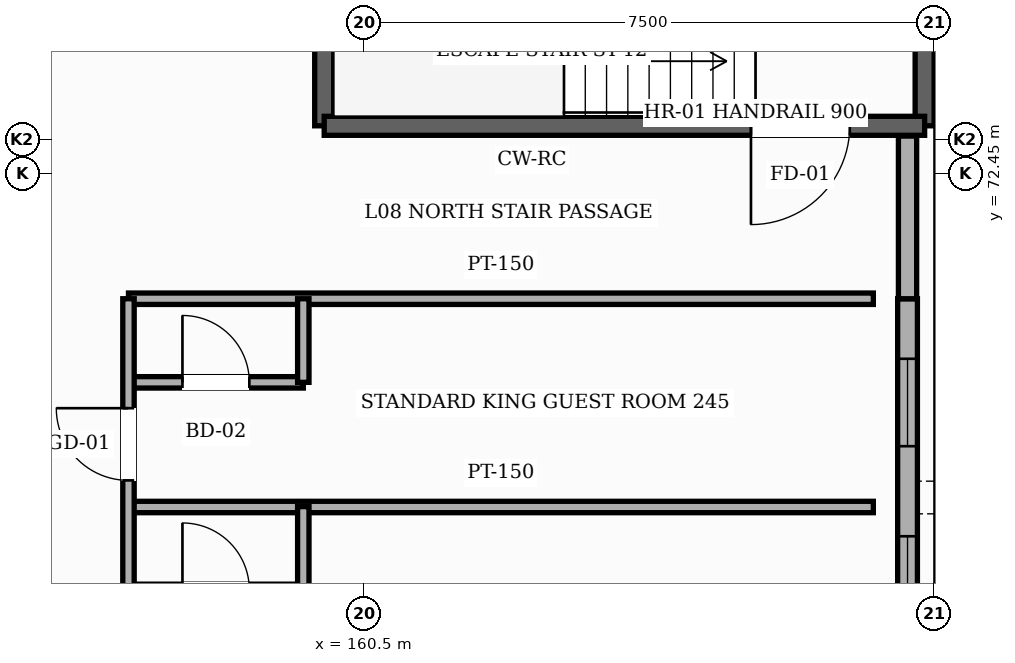
"""IFC4 building model, lengths in metres.
Left out: names, types, materials, properties, quantities, classifications, styles, units other than length and angle.
Written with IfcOpenShell. Run it as: python <this file> out.ifc"""

import sys

from ifc_helpers import new_model, si_unit, direction, frame, frame_2d, origin, place, context, subcontext, project, spatial, rectangle, extrude, element, fill, save


model = new_model("IFC4")
c1 = context("Model", 3, precision=1e-05, world=origin(), true_north=direction((0.0, 1.0)))
c2 = subcontext(c1, "Body", "Model", "MODEL_VIEW")
j1 = project(units=[si_unit("LENGTHUNIT", "METRE"), si_unit("PLANEANGLEUNIT", "RADIAN")], contexts=[c1])
p1 = place(None, origin())
s1 = spatial("IfcSite", under=j1, at=p1, CompositionType="ELEMENT")
p2 = place(p1, origin())
s2 = spatial("IfcBuilding", under=s1, at=p2, CompositionType="ELEMENT")
p3 = place(p2, frame((0.0, 0.0, 35.4)))
s3 = spatial("IfcBuildingStorey", under=s2, at=p3, CompositionType="ELEMENT", Elevation=35.4)
p4 = place(p3, frame((167.65, 70.8, 0.0), z_axis=(0.0, 0.0, 1.0), x_axis=(0.0, -1.0, 0.0)))
e1 = element("IfcWall", 1, at=p4, inside=s3, PredefinedType="SOLIDWALL", context=c2, shape_type="SweptSolid", body=[
    extrude(rectangle(XDim=6.1, YDim=0.26, at=frame_2d((3.05, 0.0))), origin(), (0.0, 0.0, 1.0), 3.365),
])
p5 = place(p4, frame((3.125, 0.0, 0.85)))
e2 = element("IfcOpeningElement", 2, at=p5, cuts=e1, PredefinedType="OPENING", context=c2, shape_type="SweptSolid", body=[
    extrude(rectangle(XDim=1.95, YDim=1.95, at=frame_2d((0.975, 0.975))), frame((0.0, 0.14, 0.0), z_axis=(0.0, -1.0, 0.0), x_axis=(1.0, 0.0, 0.0)), (0.0, 0.0, 1.0), 0.28),
])
p6 = place(p4, frame((0.79, 0.0, 0.85)))
e3 = element("IfcOpeningElement", 3, at=p6, cuts=e1, PredefinedType="OPENING", context=c2, shape_type="SweptSolid", body=[
    extrude(rectangle(XDim=1.15, YDim=1.35, at=frame_2d((0.575, 0.675))), frame((0.0, 0.14, 0.0), z_axis=(0.0, -1.0, 0.0), x_axis=(1.0, 0.0, 0.0)), (0.0, 0.0, 1.0), 0.28),
])
p7 = place(p3, frame((167.65, 72.94, 0.0), z_axis=(0.0, 0.0, 1.0), x_axis=(0.0, -1.0, 0.0)))
e4 = element("IfcWall", 4, at=p7, inside=s3, PredefinedType="SOLIDWALL", context=c2, shape_type="SweptSolid", body=[
    extrude(rectangle(XDim=2.14, YDim=0.24, at=frame_2d((1.07, 0.0))), origin(), (0.0, 0.0, 1.0), 3.365),
])
for number, where, z_axis, x_axis in (
    (5, (167.875, 76.425, 0.0), (0.0, 0.0, 1.0), (0.0, -1.0, 0.0)),
    (6, (159.975, 73.075, 0.0), (0.0, 0.0, 1.0), (0.0, 1.0, 0.0)),
):
    element("IfcWall", number, at=place(p3, frame(where, z_axis=z_axis, x_axis=x_axis)), inside=s3, PredefinedType="SHEAR", context=c2, shape_type="SweptSolid", body=[
        extrude(rectangle(XDim=3.35, YDim=0.25, at=frame_2d((1.675, 0.0))), origin(), (0.0, 0.0, 1.0), 3.38),
    ])
p8 = place(p3, frame((167.875, 73.075, 0.0), z_axis=(0.0, 0.0, 1.0), x_axis=(-1.0, 0.0, 0.0)))
e7 = element("IfcWall", 7, at=p8, inside=s3, PredefinedType="SHEAR", context=c2, shape_type="SweptSolid", body=[
    extrude(rectangle(XDim=7.9, YDim=0.25, at=frame_2d((3.95, 0.0))), origin(), (0.0, 0.0, 1.0), 3.38),
])
p9 = place(p8, frame((0.985, 0.0, 0.0)))
e8 = element("IfcOpeningElement", 8, at=p9, cuts=e7, PredefinedType="OPENING", context=c2, shape_type="SweptSolid", body=[
    extrude(rectangle(XDim=1.3, YDim=2.2, at=frame_2d((0.65, 1.1))), frame((0.0, 0.135, 0.0), z_axis=(0.0, -1.0, 0.0), x_axis=(1.0, 0.0, 0.0)), (0.0, 0.0, 1.0), 0.27),
])
p10 = place(p3, frame((157.4, 68.06, 0.0), z_axis=(0.0, 0.0, 1.0), x_axis=(1.0, 0.0, 0.0)))
e9 = element("IfcWall", 9, at=p10, inside=s3, PredefinedType="PARTITIONING", context=c2, shape_type="SweptSolid", body=[
    extrude(rectangle(XDim=9.8, YDim=0.15, at=frame_2d((4.9, 0.0))), origin(), (0.0, 0.0, 1.0), 3.365),
])
p11 = place(p3, frame((157.4, 69.7, 0.0), z_axis=(0.0, 0.0, 1.0), x_axis=(1.0, 0.0, 0.0)))
e10 = element("IfcWall", 10, at=p11, inside=s3, PredefinedType="PARTITIONING", context=c2, shape_type="SweptSolid", body=[
    extrude(rectangle(XDim=2.3, YDim=0.15, at=frame_2d((1.15, 0.0))), origin(), (0.0, 0.0, 1.0), 3.365),
])
p12 = place(p11, frame((0.71, 0.0, 0.0)))
e11 = element("IfcOpeningElement", 11, at=p12, cuts=e10, PredefinedType="OPENING", context=c2, shape_type="SweptSolid", body=[
    extrude(rectangle(XDim=0.88, YDim=2.12, at=frame_2d((0.44, 1.06))), frame((0.0, 0.085, 0.0), z_axis=(0.0, -1.0, 0.0), x_axis=(1.0, 0.0, 0.0)), (0.0, 0.0, 1.0), 0.17),
])
p13 = place(p3, frame((157.4, 70.8, 0.0), z_axis=(0.0, 0.0, 1.0), x_axis=(1.0, 0.0, 0.0)))
e12 = element("IfcWall", 12, at=p13, inside=s3, PredefinedType="PARTITIONING", context=c2, shape_type="SweptSolid", body=[
    extrude(rectangle(XDim=9.8, YDim=0.15, at=frame_2d((4.9, 0.0))), origin(), (0.0, 0.0, 1.0), 3.365),
])
p14 = place(p3, frame((157.4, 22.3, 0.0), z_axis=(0.0, 0.0, 1.0), x_axis=(0.0, 1.0, 0.0)))
e13 = element("IfcWall", 13, at=p14, inside=s3, PredefinedType="PARTITIONING", context=c2, shape_type="SweptSolid", body=[
    extrude(rectangle(XDim=48.5, YDim=0.15, at=frame_2d((24.25, 0.0))), origin(), (0.0, 0.0, 1.0), 3.365),
])
p15 = place(p14, frame((24.875, 0.0, 0.0)))
e14 = element("IfcOpeningElement", 14, at=p15, cuts=e13, PredefinedType="OPENING", context=c2, shape_type="SweptSolid", body=[
    extrude(rectangle(XDim=1.65, YDim=2.35, at=frame_2d((0.825, 1.175))), frame((0.0, 0.085, 0.0), z_axis=(0.0, -1.0, 0.0), x_axis=(1.0, 0.0, 0.0)), (0.0, 0.0, 1.0), 0.17),
])
p16 = place(p14, frame((0.275, 0.0, 0.0)))
e15 = element("IfcOpeningElement", 15, at=p16, cuts=e13, PredefinedType="OPENING", context=c2, shape_type="SweptSolid", body=[
    extrude(rectangle(XDim=1.1, YDim=2.2, at=frame_2d((0.55, 1.1))), frame((0.0, 0.085, 0.0), z_axis=(0.0, -1.0, 0.0), x_axis=(1.0, 0.0, 0.0)), (0.0, 0.0, 1.0), 0.17),
])
p17 = place(p14, frame((3.11, 0.0, 0.0)))
e16 = element("IfcOpeningElement", 16, at=p17, cuts=e13, PredefinedType="OPENING", context=c2, shape_type="SweptSolid", body=[
    extrude(rectangle(XDim=0.95, YDim=2.15, at=frame_2d((0.475, 1.075))), frame((0.0, 0.085, 0.0), z_axis=(0.0, -1.0, 0.0), x_axis=(1.0, 0.0, 0.0)), (0.0, 0.0, 1.0), 0.17),
])
p18 = place(p14, frame((5.865, 0.0, 0.0)))
e17 = element("IfcOpeningElement", 17, at=p18, cuts=e13, PredefinedType="OPENING", context=c2, shape_type="SweptSolid", body=[
    extrude(rectangle(XDim=0.95, YDim=2.15, at=frame_2d((0.475, 1.075))), frame((0.0, 0.085, 0.0), z_axis=(0.0, -1.0, 0.0), x_axis=(1.0, 0.0, 0.0)), (0.0, 0.0, 1.0), 0.17),
])
p19 = place(p14, frame((8.625, 0.0, 0.0)))
e18 = element("IfcOpeningElement", 18, at=p19, cuts=e13, PredefinedType="OPENING", context=c2, shape_type="SweptSolid", body=[
    extrude(rectangle(XDim=0.95, YDim=2.15, at=frame_2d((0.475, 1.075))), frame((0.0, 0.085, 0.0), z_axis=(0.0, -1.0, 0.0), x_axis=(1.0, 0.0, 0.0)), (0.0, 0.0, 1.0), 0.17),
])
p20 = place(p14, frame((11.38, 0.0, 0.0)))
e19 = element("IfcOpeningElement", 19, at=p20, cuts=e13, PredefinedType="OPENING", context=c2, shape_type="SweptSolid", body=[
    extrude(rectangle(XDim=0.95, YDim=2.15, at=frame_2d((0.475, 1.075))), frame((0.0, 0.085, 0.0), z_axis=(0.0, -1.0, 0.0), x_axis=(1.0, 0.0, 0.0)), (0.0, 0.0, 1.0), 0.17),
])
p21 = place(p14, frame((14.14, 0.0, 0.0)))
e20 = element("IfcOpeningElement", 20, at=p21, cuts=e13, PredefinedType="OPENING", context=c2, shape_type="SweptSolid", body=[
    extrude(rectangle(XDim=0.95, YDim=2.15, at=frame_2d((0.475, 1.075))), frame((0.0, 0.085, 0.0), z_axis=(0.0, -1.0, 0.0), x_axis=(1.0, 0.0, 0.0)), (0.0, 0.0, 1.0), 0.17),
])
p22 = place(p14, frame((16.895, 0.0, 0.0)))
e21 = element("IfcOpeningElement", 21, at=p22, cuts=e13, PredefinedType="OPENING", context=c2, shape_type="SweptSolid", body=[
    extrude(rectangle(XDim=0.95, YDim=2.15, at=frame_2d((0.475, 1.075))), frame((0.0, 0.085, 0.0), z_axis=(0.0, -1.0, 0.0), x_axis=(1.0, 0.0, 0.0)), (0.0, 0.0, 1.0), 0.17),
])
p23 = place(p14, frame((32.37, 0.0, 0.0)))
e22 = element("IfcOpeningElement", 22, at=p23, cuts=e13, PredefinedType="OPENING", context=c2, shape_type="SweptSolid", body=[
    extrude(rectangle(XDim=1.1, YDim=2.2, at=frame_2d((0.55, 1.1))), frame((0.0, 0.085, 0.0), z_axis=(0.0, -1.0, 0.0), x_axis=(1.0, 0.0, 0.0)), (0.0, 0.0, 1.0), 0.17),
])
p24 = place(p14, frame((35.175, 0.0, 0.0)))
e23 = element("IfcOpeningElement", 23, at=p24, cuts=e13, PredefinedType="OPENING", context=c2, shape_type="SweptSolid", body=[
    extrude(rectangle(XDim=0.95, YDim=2.15, at=frame_2d((0.475, 1.075))), frame((0.0, 0.085, 0.0), z_axis=(0.0, -1.0, 0.0), x_axis=(1.0, 0.0, 0.0)), (0.0, 0.0, 1.0), 0.17),
])
p25 = place(p14, frame((37.91, 0.0, 0.0)))
e24 = element("IfcOpeningElement", 24, at=p25, cuts=e13, PredefinedType="OPENING", context=c2, shape_type="SweptSolid", body=[
    extrude(rectangle(XDim=0.95, YDim=2.15, at=frame_2d((0.475, 1.075))), frame((0.0, 0.085, 0.0), z_axis=(0.0, -1.0, 0.0), x_axis=(1.0, 0.0, 0.0)), (0.0, 0.0, 1.0), 0.17),
])
p26 = place(p14, frame((40.64, 0.0, 0.0)))
e25 = element("IfcOpeningElement", 25, at=p26, cuts=e13, PredefinedType="OPENING", context=c2, shape_type="SweptSolid", body=[
    extrude(rectangle(XDim=0.95, YDim=2.15, at=frame_2d((0.475, 1.075))), frame((0.0, 0.085, 0.0), z_axis=(0.0, -1.0, 0.0), x_axis=(1.0, 0.0, 0.0)), (0.0, 0.0, 1.0), 0.17),
])
p27 = place(p14, frame((43.375, 0.0, 0.0)))
e26 = element("IfcOpeningElement", 26, at=p27, cuts=e13, PredefinedType="OPENING", context=c2, shape_type="SweptSolid", body=[
    extrude(rectangle(XDim=0.95, YDim=2.15, at=frame_2d((0.475, 1.075))), frame((0.0, 0.085, 0.0), z_axis=(0.0, -1.0, 0.0), x_axis=(1.0, 0.0, 0.0)), (0.0, 0.0, 1.0), 0.17),
])
p28 = place(p14, frame((46.11, 0.0, 0.0)))
e27 = element("IfcOpeningElement", 27, at=p28, cuts=e13, PredefinedType="OPENING", context=c2, shape_type="SweptSolid", body=[
    extrude(rectangle(XDim=0.95, YDim=2.15, at=frame_2d((0.475, 1.075))), frame((0.0, 0.085, 0.0), z_axis=(0.0, -1.0, 0.0), x_axis=(1.0, 0.0, 0.0)), (0.0, 0.0, 1.0), 0.17),
])
p29 = place(p3, frame((159.7, 66.965, 0.0), z_axis=(0.0, 0.0, 1.0), x_axis=(0.0, 1.0, 0.0)))
e28 = element("IfcWall", 28, at=p29, inside=s3, PredefinedType="PARTITIONING", context=c2, shape_type="SweptSolid", body=[
    extrude(rectangle(XDim=1.1, YDim=0.15, at=frame_2d((0.55, 0.0))), origin(), (0.0, 0.0, 1.0), 3.365),
])
p30 = place(p3, frame((159.7, 69.7, 0.0), z_axis=(0.0, 0.0, 1.0), x_axis=(0.0, 1.0, 0.0)))
e29 = element("IfcWall", 29, at=p30, inside=s3, PredefinedType="PARTITIONING", context=c2, shape_type="SweptSolid", body=[
    extrude(rectangle(XDim=1.1, YDim=0.15, at=frame_2d((0.55, 0.0))), origin(), (0.0, 0.0, 1.0), 3.365),
])
p31 = place(p5, origin())
e30 = element("IfcWindow", 30, at=p31, inside=s3, PartitioningType="SINGLE_PANEL", PredefinedType="WINDOW", context=c2, shape_type="SweptSolid", body=[
    extrude(rectangle(XDim=1.95, YDim=1.95, at=frame_2d((0.975, 0.975))), frame((0.0, 0.03, 0.0), z_axis=(0.0, -1.0, 0.0), x_axis=(1.0, 0.0, 0.0)), (0.0, 0.0, 1.0), 0.06),
])
fill(e2, e30)
p32 = place(p6, origin())
e31 = element("IfcWindow", 31, at=p32, inside=s3, PartitioningType="SINGLE_PANEL", PredefinedType="WINDOW", context=c2, shape_type="SweptSolid", body=[
    extrude(rectangle(XDim=1.15, YDim=1.35, at=frame_2d((0.575, 0.675))), frame((0.0, 0.03, 0.0), z_axis=(0.0, -1.0, 0.0), x_axis=(1.0, 0.0, 0.0)), (0.0, 0.0, 1.0), 0.06),
])
fill(e3, e31)
p33 = place(p9, origin())
e32 = element("IfcDoor", 32, at=p33, inside=s3, OperationType="SINGLE_SWING_RIGHT", PredefinedType="DOOR", context=c2, shape_type="SweptSolid", body=[
    extrude(rectangle(XDim=1.3, YDim=2.2, at=frame_2d((0.65, 1.1))), frame((0.0, 0.025, 0.0), z_axis=(0.0, -1.0, 0.0), x_axis=(1.0, 0.0, 0.0)), (0.0, 0.0, 1.0), 0.05),
])
fill(e8, e32)
p34 = place(p28, origin())
e33 = element("IfcDoor", 33, at=p34, inside=s3, OperationType="SINGLE_SWING_RIGHT", PredefinedType="DOOR", context=c2, shape_type="SweptSolid", body=[
    extrude(rectangle(XDim=0.95, YDim=2.15, at=frame_2d((0.475, 1.075))), frame((0.0, 0.025, 0.0), z_axis=(0.0, -1.0, 0.0), x_axis=(1.0, 0.0, 0.0)), (0.0, 0.0, 1.0), 0.05),
])
fill(e27, e33)
p35 = place(p12, origin())
e34 = element("IfcDoor", 34, at=p35, inside=s3, OperationType="SINGLE_SWING_LEFT", PredefinedType="DOOR", context=c2, shape_type="SweptSolid", body=[
    extrude(rectangle(XDim=0.88, YDim=2.12, at=frame_2d((0.44, 1.06))), frame((0.0, 0.025, 0.0), z_axis=(0.0, -1.0, 0.0), x_axis=(1.0, 0.0, 0.0)), (0.0, 0.0, 1.0), 0.05),
])
fill(e11, e34)
save(model, sys.argv[1])
